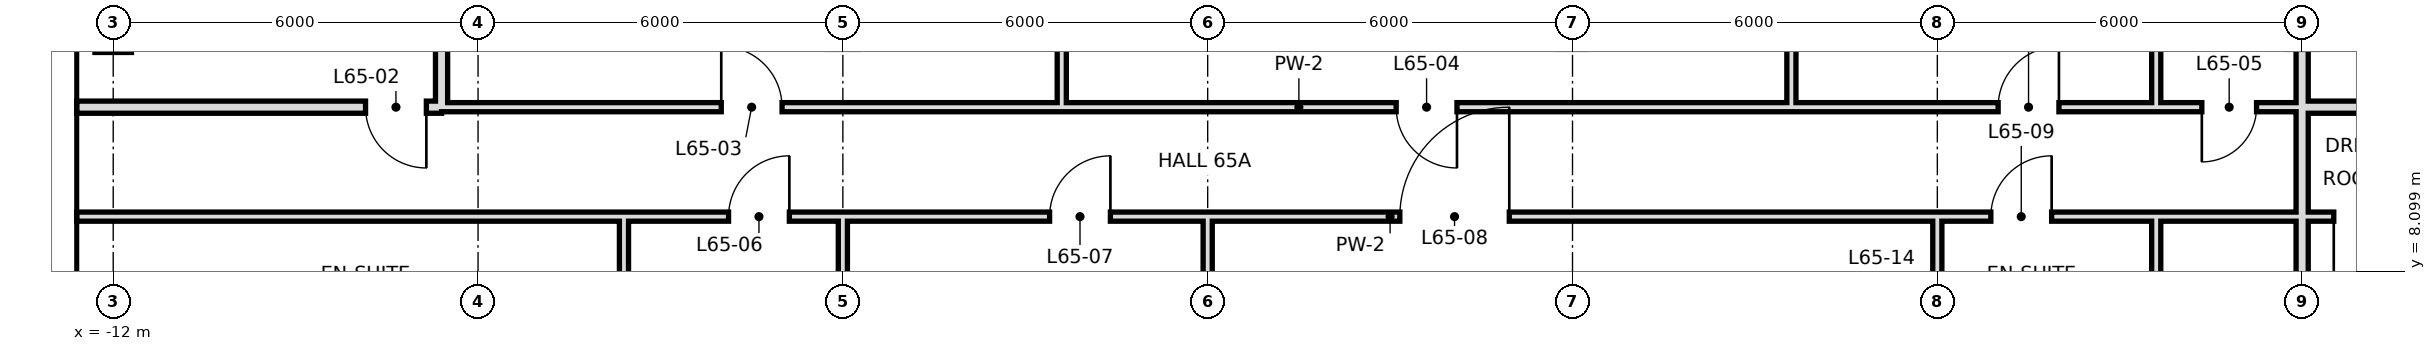
"""IFC4 building model, lengths in metres.
Left out: names, types, materials, properties, quantities, classifications, styles, units other than length and angle.
Written with IfcOpenShell. Run it as: python <this file> out.ifc"""

import sys

from ifc_helpers import new_model, si_unit, direction, frame, frame_2d, origin, place, context, subcontext, project, spatial, rectangle, extrude, element, fill, save


model = new_model("IFC4")
c1 = context("Model", 3, precision=1e-05, world=origin(), true_north=direction((0.0, 1.0)))
c2 = subcontext(c1, "Body", "Model", "MODEL_VIEW")
j1 = project(units=[si_unit("LENGTHUNIT", "METRE"), si_unit("PLANEANGLEUNIT", "RADIAN")], contexts=[c1])
p1 = place(None, origin())
s1 = spatial("IfcSite", under=j1, at=p1, CompositionType="ELEMENT")
p2 = place(p1, origin())
s2 = spatial("IfcBuilding", under=s1, at=p2, CompositionType="ELEMENT")
p3 = place(p2, frame((0.0, 0.0, 273.8)))
s3 = spatial("IfcBuildingStorey", under=s2, at=p3, CompositionType="ELEMENT", Elevation=273.8)
p4 = place(p3, frame((-3.6, 6.0, 0.0), z_axis=(0.0, 0.0, 1.0), x_axis=(0.0, 1.0, 0.0)))
e1 = element("IfcWall", 1, at=p4, inside=s3, PredefinedType="PARTITIONING", context=c2, shape_type="SweptSolid", body=[
    extrude(rectangle(XDim=3.0, YDim=0.15, at=frame_2d((1.5, 0.0))), origin(), (0.0, 0.0, 1.0), 3.42),
])
p5 = place(p3, frame((-6.6, 10.8, 0.0), z_axis=(0.0, 0.0, 1.0), x_axis=(0.0, 1.0, 0.0)))
e2 = element("IfcWall", 2, at=p5, inside=s3, PredefinedType="SOLIDWALL", context=c2, shape_type="SweptSolid", body=[
    extrude(rectangle(XDim=7.2, YDim=0.2, at=frame_2d((3.6, 0.0))), origin(), (0.0, 0.0, 1.0), 2.72),
])
p6 = place(p3, frame((0.0, 0.0, 0.0), z_axis=(0.0, 0.0, 1.0), x_axis=(0.0, 1.0, 0.0)))
e3 = element("IfcWall", 3, at=p6, inside=s3, PredefinedType="PARTITIONING", context=c2, shape_type="SweptSolid", body=[
    extrude(rectangle(XDim=9.0, YDim=0.15, at=frame_2d((4.5, 0.0))), origin(), (0.0, 0.0, 1.0), 2.72),
])
p7 = place(p3, frame((15.6, 10.8, 0.0), z_axis=(0.0, 0.0, 1.0), x_axis=(0.0, 1.0, 0.0)))
e4 = element("IfcWall", 4, at=p7, inside=s3, PredefinedType="PARTITIONING", context=c2, shape_type="SweptSolid", body=[
    extrude(rectangle(XDim=7.9, YDim=0.15, at=frame_2d((3.95, 0.0))), origin(), (0.0, 0.0, 1.0), 3.42),
])
p8 = place(p3, frame((18.0, -0.6, 0.0), z_axis=(0.0, 0.0, 1.0), x_axis=(0.0, 1.0, 0.0)))
e5 = element("IfcWall", 5, at=p8, inside=s3, PredefinedType="PARTITIONING", context=c2, shape_type="SweptSolid", body=[
    extrude(rectangle(XDim=9.6, YDim=0.15, at=frame_2d((4.8, 0.0))), origin(), (0.0, 0.0, 1.0), 2.72),
])
p9 = place(p3, frame((21.6, 6.0, 0.0), z_axis=(0.0, 0.0, 1.0), x_axis=(0.0, 1.0, 0.0)))
e6 = element("IfcWall", 6, at=p9, inside=s3, PredefinedType="PARTITIONING", context=c2, shape_type="SweptSolid", body=[
    extrude(rectangle(XDim=3.0, YDim=0.15, at=frame_2d((1.5, 0.0))), origin(), (0.0, 0.0, 1.0), 3.42),
])
p10 = place(p3, frame((21.6, 10.8, 0.0), z_axis=(0.0, 0.0, 1.0), x_axis=(0.0, 1.0, 0.0)))
e7 = element("IfcWall", 7, at=p10, inside=s3, PredefinedType="PARTITIONING", context=c2, shape_type="SweptSolid", body=[
    extrude(rectangle(XDim=7.9, YDim=0.15, at=frame_2d((3.95, 0.0))), origin(), (0.0, 0.0, 1.0), 3.42),
])
p11 = place(p3, frame((24.0, 10.8, 0.0), z_axis=(0.0, 0.0, 1.0), x_axis=(0.0, 1.0, 0.0)))
e8 = element("IfcWall", 8, at=p11, inside=s3, PredefinedType="SOLIDWALL", context=c2, shape_type="SweptSolid", body=[
    extrude(rectangle(XDim=7.9, YDim=0.2, at=frame_2d((3.95, 0.0))), origin(), (0.0, 0.0, 1.0), 2.72),
])
p12 = place(p3, frame((24.0, 0.0, 0.0), z_axis=(0.0, 0.0, 1.0), x_axis=(0.0, 1.0, 0.0)))
e9 = element("IfcWall", 9, at=p12, inside=s3, PredefinedType="SOLIDWALL", context=c2, shape_type="SweptSolid", body=[
    extrude(rectangle(XDim=10.8, YDim=0.2, at=frame_2d((5.4, 0.0))), origin(), (0.0, 0.0, 1.0), 2.72),
])
p13 = place(p3, frame((3.6, 10.8, 0.0), z_axis=(0.0, 0.0, 1.0), x_axis=(0.0, 1.0, 0.0)))
e10 = element("IfcWall", 10, at=p13, inside=s3, PredefinedType="PARTITIONING", context=c2, shape_type="SweptSolid", body=[
    extrude(rectangle(XDim=7.9, YDim=0.15, at=frame_2d((3.95, 0.0))), origin(), (0.0, 0.0, 1.0), 3.42),
])
p14 = place(p3, frame((6.0, -0.6, 0.0), z_axis=(0.0, 0.0, 1.0), x_axis=(0.0, 1.0, 0.0)))
e11 = element("IfcWall", 11, at=p14, inside=s3, PredefinedType="PARTITIONING", context=c2, shape_type="SweptSolid", body=[
    extrude(rectangle(XDim=9.6, YDim=0.15, at=frame_2d((4.8, 0.0))), origin(), (0.0, 0.0, 1.0), 2.72),
])
p15 = place(p3, frame((-12.6, 10.8, 0.0), z_axis=(0.0, 0.0, 1.0), x_axis=(1.0, 0.0, 0.0)))
e12 = element("IfcWall", 12, at=p15, inside=s3, PredefinedType="SOLIDWALL", context=c2, shape_type="SweptSolid", body=[
    extrude(rectangle(XDim=6.0, YDim=0.2, at=frame_2d((3.0, 0.0))), origin(), (0.0, 0.0, 1.0), 2.97),
])
p16 = place(p15, frame((4.75, 0.0, 0.0)))
e13 = element("IfcOpeningElement", 13, at=p16, cuts=e12, PredefinedType="OPENING", context=c2, shape_type="SweptSolid", body=[
    extrude(rectangle(XDim=1.0, YDim=2.4, at=frame_2d((0.5, 1.2))), frame((0.0, 0.11, 0.0), z_axis=(0.0, -1.0, 0.0), x_axis=(1.0, 0.0, 0.0)), (0.0, 0.0, 1.0), 0.22),
])
p17 = place(p3, frame((24.0, 10.8, 0.0), z_axis=(0.0, 0.0, 1.0), x_axis=(1.0, 0.0, 0.0)))
e14 = element("IfcWall", 14, at=p17, inside=s3, PredefinedType="SOLIDWALL", context=c2, shape_type="SweptSolid", body=[
    extrude(rectangle(XDim=3.6, YDim=0.2, at=frame_2d((1.8, 0.0))), origin(), (0.0, 0.0, 1.0), 2.72),
])
p18 = place(p17, frame((1.3, 0.0, 0.0)))
e15 = element("IfcOpeningElement", 15, at=p18, cuts=e14, PredefinedType="OPENING", context=c2, shape_type="SweptSolid", body=[
    extrude(rectangle(XDim=1.0, YDim=2.4, at=frame_2d((0.5, 1.2))), frame((0.0, 0.11, 0.0), z_axis=(0.0, -1.0, 0.0), x_axis=(1.0, 0.0, 0.0)), (0.0, 0.0, 1.0), 0.22),
])
p19 = place(p3, frame((-6.6, 10.8, 0.0), z_axis=(0.0, 0.0, 1.0), x_axis=(1.0, 0.0, 0.0)))
e16 = element("IfcWall", 16, at=p19, inside=s3, PredefinedType="PARTITIONING", context=c2, shape_type="SweptSolid", body=[
    extrude(rectangle(XDim=28.2, YDim=0.15, at=frame_2d((14.1, 0.0))), origin(), (0.0, 0.0, 1.0), 3.42),
])
p20 = place(p19, frame((25.6, 0.0, 0.0)))
e17 = element("IfcOpeningElement", 17, at=p20, cuts=e16, PredefinedType="OPENING", context=c2, shape_type="SweptSolid", body=[
    extrude(rectangle(XDim=1.0, YDim=2.4, at=frame_2d((0.5, 1.2))), frame((0.0, 0.085, 0.0), z_axis=(0.0, -1.0, 0.0), x_axis=(1.0, 0.0, 0.0)), (0.0, 0.0, 1.0), 0.17),
])
p21 = place(p19, frame((4.6, 0.0, 0.0)))
e18 = element("IfcOpeningElement", 18, at=p21, cuts=e16, PredefinedType="OPENING", context=c2, shape_type="SweptSolid", body=[
    extrude(rectangle(XDim=1.0, YDim=2.4, at=frame_2d((0.5, 1.2))), frame((0.0, 0.085, 0.0), z_axis=(0.0, -1.0, 0.0), x_axis=(1.0, 0.0, 0.0)), (0.0, 0.0, 1.0), 0.17),
])
p22 = place(p19, frame((15.7, 0.0, 0.0)))
e19 = element("IfcOpeningElement", 19, at=p22, cuts=e16, PredefinedType="OPENING", context=c2, shape_type="SweptSolid", body=[
    extrude(rectangle(XDim=1.0, YDim=2.4, at=frame_2d((0.5, 1.2))), frame((0.0, 0.085, 0.0), z_axis=(0.0, -1.0, 0.0), x_axis=(1.0, 0.0, 0.0)), (0.0, 0.0, 1.0), 0.17),
])
p23 = place(p3, frame((21.6, 10.8, 0.0), z_axis=(0.0, 0.0, 1.0), x_axis=(1.0, 0.0, 0.0)))
e20 = element("IfcWall", 20, at=p23, inside=s3, PredefinedType="PARTITIONING", context=c2, shape_type="SweptSolid", body=[
    extrude(rectangle(XDim=2.4, YDim=0.15, at=frame_2d((1.2, 0.0))), origin(), (0.0, 0.0, 1.0), 3.42),
])
p24 = place(p23, frame((0.75, 0.0, 0.0)))
e21 = element("IfcOpeningElement", 21, at=p24, cuts=e20, PredefinedType="OPENING", context=c2, shape_type="SweptSolid", body=[
    extrude(rectangle(XDim=0.9, YDim=2.4, at=frame_2d((0.45, 1.2))), frame((0.0, 0.085, 0.0), z_axis=(0.0, -1.0, 0.0), x_axis=(1.0, 0.0, 0.0)), (0.0, 0.0, 1.0), 0.17),
])
p25 = place(p3, frame((-3.6, 9.0, 0.0), z_axis=(0.0, 0.0, 1.0), x_axis=(1.0, 0.0, 0.0)))
e22 = element("IfcWall", 22, at=p25, inside=s3, PredefinedType="PARTITIONING", context=c2, shape_type="SweptSolid", body=[
    extrude(rectangle(XDim=25.2, YDim=0.15, at=frame_2d((12.6, 0.0))), origin(), (0.0, 0.0, 1.0), 3.42),
])
p26 = place(p25, frame((1.72, 0.0, 0.0)))
e23 = element("IfcOpeningElement", 23, at=p26, cuts=e22, PredefinedType="OPENING", context=c2, shape_type="SweptSolid", body=[
    extrude(rectangle(XDim=1.0, YDim=2.4, at=frame_2d((0.5, 1.2))), frame((0.0, 0.085, 0.0), z_axis=(0.0, -1.0, 0.0), x_axis=(1.0, 0.0, 0.0)), (0.0, 0.0, 1.0), 0.17),
])
p27 = place(p25, frame((7.0, 0.0, 0.0)))
e24 = element("IfcOpeningElement", 24, at=p27, cuts=e22, PredefinedType="OPENING", context=c2, shape_type="SweptSolid", body=[
    extrude(rectangle(XDim=1.0, YDim=2.4, at=frame_2d((0.5, 1.2))), frame((0.0, 0.085, 0.0), z_axis=(0.0, -1.0, 0.0), x_axis=(1.0, 0.0, 0.0)), (0.0, 0.0, 1.0), 0.17),
])
p28 = place(p25, frame((12.76, 0.0, 0.0)))
e25 = element("IfcOpeningElement", 25, at=p28, cuts=e22, PredefinedType="OPENING", context=c2, shape_type="SweptSolid", body=[
    extrude(rectangle(XDim=1.8, YDim=2.4, at=frame_2d((0.9, 1.2))), frame((0.0, 0.085, 0.0), z_axis=(0.0, -1.0, 0.0), x_axis=(1.0, 0.0, 0.0)), (0.0, 0.0, 1.0), 0.17),
])
p29 = place(p25, frame((22.48, 0.0, 0.0)))
e26 = element("IfcOpeningElement", 26, at=p29, cuts=e22, PredefinedType="OPENING", context=c2, shape_type="SweptSolid", body=[
    extrude(rectangle(XDim=1.0, YDim=2.4, at=frame_2d((0.5, 1.2))), frame((0.0, 0.085, 0.0), z_axis=(0.0, -1.0, 0.0), x_axis=(1.0, 0.0, 0.0)), (0.0, 0.0, 1.0), 0.17),
])
p30 = place(p3, frame((24.0, 9.0, 0.0), z_axis=(0.0, 0.0, 1.0), x_axis=(1.0, 0.0, 0.0)))
e27 = element("IfcWall", 27, at=p30, inside=s3, PredefinedType="PARTITIONING", context=c2, shape_type="SweptSolid", body=[
    extrude(rectangle(XDim=2.4, YDim=0.15, at=frame_2d((1.2, 0.0))), origin(), (0.0, 0.0, 1.0), 3.42),
])
p31 = place(p30, frame((0.52, 0.0, 0.0)))
e28 = element("IfcOpeningElement", 28, at=p31, cuts=e27, PredefinedType="OPENING", context=c2, shape_type="SweptSolid", body=[
    extrude(rectangle(XDim=1.0, YDim=2.4, at=frame_2d((0.5, 1.2))), frame((0.0, 0.085, 0.0), z_axis=(0.0, -1.0, 0.0), x_axis=(1.0, 0.0, 0.0)), (0.0, 0.0, 1.0), 0.17),
])
p32 = place(p3, frame((-12.6, 9.0, 0.0), z_axis=(0.0, 0.0, 1.0), x_axis=(1.0, 0.0, 0.0)))
e29 = element("IfcWall", 29, at=p32, inside=s3, PredefinedType="PARTITIONING", context=c2, shape_type="SweptSolid", body=[
    extrude(rectangle(XDim=9.0, YDim=0.15, at=frame_2d((4.5, 0.0))), origin(), (0.0, 0.0, 1.0), 3.42),
])
p33 = place(p3, frame((21.6, 9.0, 0.0), z_axis=(0.0, 0.0, 1.0), x_axis=(1.0, 0.0, 0.0)))
e30 = element("IfcWall", 30, at=p33, inside=s3, PredefinedType="PARTITIONING", context=c2, shape_type="SweptSolid", body=[
    extrude(rectangle(XDim=2.4, YDim=0.15, at=frame_2d((1.2, 0.0))), origin(), (0.0, 0.0, 1.0), 3.42),
])
p34 = place(p20, frame((1.0, 0.0, 0.0), z_axis=(0.0, 0.0, 1.0), x_axis=(-1.0, 0.0, 0.0)))
e31 = element("IfcDoor", 31, at=p34, inside=s3, OperationType="SINGLE_SWING_LEFT", PredefinedType="DOOR", context=c2, shape_type="SweptSolid", body=[
    extrude(rectangle(XDim=1.0, YDim=2.4, at=frame_2d((0.5, 1.2))), frame((0.0, 0.025, 0.0), z_axis=(0.0, -1.0, 0.0), x_axis=(1.0, 0.0, 0.0)), (0.0, 0.0, 1.0), 0.05),
])
fill(e17, e31)
p35 = place(p16, origin())
e32 = element("IfcDoor", 32, at=p35, inside=s3, OperationType="SINGLE_SWING_RIGHT", PredefinedType="DOOR", context=c2, shape_type="SweptSolid", body=[
    extrude(rectangle(XDim=1.0, YDim=2.4, at=frame_2d((0.5, 1.2))), frame((0.0, 0.025, 0.0), z_axis=(0.0, -1.0, 0.0), x_axis=(1.0, 0.0, 0.0)), (0.0, 0.0, 1.0), 0.05),
])
fill(e13, e32)
p36 = place(p21, origin())
e33 = element("IfcDoor", 33, at=p36, inside=s3, OperationType="SINGLE_SWING_LEFT", PredefinedType="DOOR", context=c2, shape_type="SweptSolid", body=[
    extrude(rectangle(XDim=1.0, YDim=2.4, at=frame_2d((0.5, 1.2))), frame((0.0, 0.025, 0.0), z_axis=(0.0, -1.0, 0.0), x_axis=(1.0, 0.0, 0.0)), (0.0, 0.0, 1.0), 0.05),
])
fill(e18, e33)
p37 = place(p22, origin())
e34 = element("IfcDoor", 34, at=p37, inside=s3, OperationType="SINGLE_SWING_RIGHT", PredefinedType="DOOR", context=c2, shape_type="SweptSolid", body=[
    extrude(rectangle(XDim=1.0, YDim=2.4, at=frame_2d((0.5, 1.2))), frame((0.0, 0.025, 0.0), z_axis=(0.0, -1.0, 0.0), x_axis=(1.0, 0.0, 0.0)), (0.0, 0.0, 1.0), 0.05),
])
fill(e19, e34)
p38 = place(p24, frame((0.9, 0.0, 0.0), z_axis=(0.0, 0.0, 1.0), x_axis=(-1.0, 0.0, 0.0)))
e35 = element("IfcDoor", 35, at=p38, inside=s3, OperationType="SINGLE_SWING_RIGHT", PredefinedType="DOOR", context=c2, shape_type="SweptSolid", body=[
    extrude(rectangle(XDim=0.9, YDim=2.4, at=frame_2d((0.45, 1.2))), frame((0.0, 0.025, 0.0), z_axis=(0.0, -1.0, 0.0), x_axis=(1.0, 0.0, 0.0)), (0.0, 0.0, 1.0), 0.05),
])
fill(e21, e35)
p39 = place(p26, frame((1.0, 0.0, 0.0), z_axis=(0.0, 0.0, 1.0), x_axis=(-1.0, 0.0, 0.0)))
e36 = element("IfcDoor", 36, at=p39, inside=s3, OperationType="SINGLE_SWING_LEFT", PredefinedType="DOOR", context=c2, shape_type="SweptSolid", body=[
    extrude(rectangle(XDim=1.0, YDim=2.4, at=frame_2d((0.5, 1.2))), frame((0.0, 0.025, 0.0), z_axis=(0.0, -1.0, 0.0), x_axis=(1.0, 0.0, 0.0)), (0.0, 0.0, 1.0), 0.05),
])
fill(e23, e36)
p40 = place(p27, frame((1.0, 0.0, 0.0), z_axis=(0.0, 0.0, 1.0), x_axis=(-1.0, 0.0, 0.0)))
e37 = element("IfcDoor", 37, at=p40, inside=s3, OperationType="SINGLE_SWING_LEFT", PredefinedType="DOOR", context=c2, shape_type="SweptSolid", body=[
    extrude(rectangle(XDim=1.0, YDim=2.4, at=frame_2d((0.5, 1.2))), frame((0.0, 0.025, 0.0), z_axis=(0.0, -1.0, 0.0), x_axis=(1.0, 0.0, 0.0)), (0.0, 0.0, 1.0), 0.05),
])
fill(e24, e37)
p41 = place(p28, frame((1.8, 0.0, 0.0), z_axis=(0.0, 0.0, 1.0), x_axis=(-1.0, 0.0, 0.0)))
e38 = element("IfcDoor", 38, at=p41, inside=s3, OperationType="SINGLE_SWING_LEFT", PredefinedType="DOOR", context=c2, shape_type="SweptSolid", body=[
    extrude(rectangle(XDim=1.8, YDim=2.4, at=frame_2d((0.9, 1.2))), frame((0.0, 0.025, 0.0), z_axis=(0.0, -1.0, 0.0), x_axis=(1.0, 0.0, 0.0)), (0.0, 0.0, 1.0), 0.05),
])
fill(e25, e38)
p42 = place(p29, frame((1.0, 0.0, 0.0), z_axis=(0.0, 0.0, 1.0), x_axis=(-1.0, 0.0, 0.0)))
e39 = element("IfcDoor", 39, at=p42, inside=s3, OperationType="SINGLE_SWING_LEFT", PredefinedType="DOOR", context=c2, shape_type="SweptSolid", body=[
    extrude(rectangle(XDim=1.0, YDim=2.4, at=frame_2d((0.5, 1.2))), frame((0.0, 0.025, 0.0), z_axis=(0.0, -1.0, 0.0), x_axis=(1.0, 0.0, 0.0)), (0.0, 0.0, 1.0), 0.05),
])
fill(e26, e39)
p43 = place(p31, frame((1.0, 0.0, 0.0), z_axis=(0.0, 0.0, 1.0), x_axis=(-1.0, 0.0, 0.0)))
e40 = element("IfcDoor", 40, at=p43, inside=s3, OperationType="SINGLE_SWING_RIGHT", PredefinedType="DOOR", context=c2, shape_type="SweptSolid", body=[
    extrude(rectangle(XDim=1.0, YDim=2.4, at=frame_2d((0.5, 1.2))), frame((0.0, 0.025, 0.0), z_axis=(0.0, -1.0, 0.0), x_axis=(1.0, 0.0, 0.0)), (0.0, 0.0, 1.0), 0.05),
])
fill(e28, e40)
save(model, sys.argv[1])
